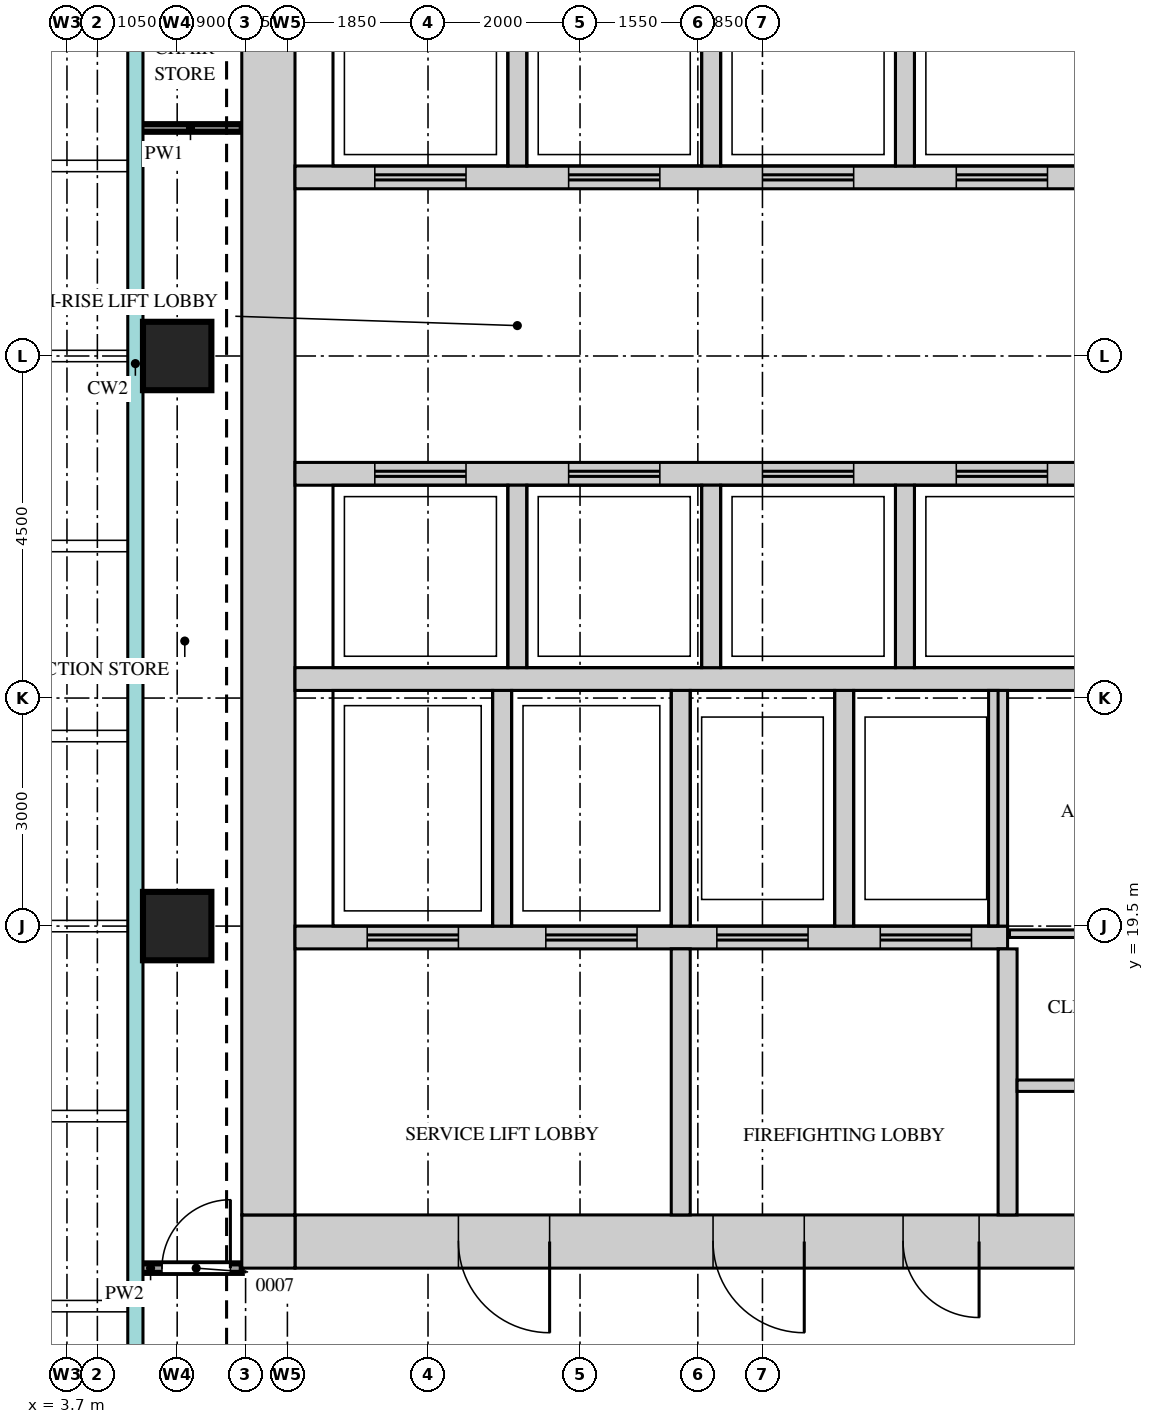
"""IFC4 building model, lengths in metres.
Left out: names, types, materials, properties, quantities, classifications, styles, units other than length and angle.
Written with IfcOpenShell. Run it as: python <this file> out.ifc"""

import sys

from ifc_helpers import new_model, si_unit, direction, frame, frame_2d, origin, origin_2d, place, context, subcontext, project, spatial, rectangle, extrude, source, transform, mapped, element, fill, save


model = new_model("IFC4")
c1 = context("Model", 3, precision=1e-05, world=origin(), true_north=direction((0.0, 1.0)))
c2 = subcontext(c1, "Body", "Model", "MODEL_VIEW")
j1 = project(units=[si_unit("LENGTHUNIT", "METRE"), si_unit("PLANEANGLEUNIT", "RADIAN")], contexts=[c1])
p1 = place(None, origin())
s1 = spatial("IfcSite", under=j1, at=p1, CompositionType="ELEMENT")
p2 = place(p1, origin())
s2 = spatial("IfcBuilding", under=s1, at=p2, CompositionType="ELEMENT")
p3 = place(p2, frame((0.0, 0.0, 258.2)))
s3 = spatial("IfcBuildingStorey", under=s2, at=p3, CompositionType="ELEMENT", Elevation=258.2)
m1 = source(origin(), c2, "Body", "SweptSolid", [
    extrude(rectangle(XDim=13.6, YDim=0.7, at=frame_2d((6.8, 0.0))), origin(), (0.0, 0.0, 1.0), 3.75),
])
p4 = place(p3, frame((6.7, 15.35, 0.0), z_axis=(0.0, 0.0, 1.0), x_axis=(1.0, 0.0, 0.0)))
e1 = element("IfcWall", 1, at=p4, inside=s3, PredefinedType="SHEAR", context=c2, shape_type="MappedRepresentation", body=[
    mapped(m1, transform((0.0, 0.0, 0.0))),
])
m2 = source(origin(), c2, "Body", "SweptSolid", [
    extrude(rectangle(XDim=1.2, YDim=2.1, at=frame_2d((0.6, 1.05))), frame((0.0, 0.36, 0.0), z_axis=(0.0, -1.0, 0.0), x_axis=(1.0, 0.0, 0.0)), (0.0, 0.0, 1.0), 0.72),
])
p5 = place(p4, frame((5.5, 0.0, 0.0)))
e2 = element("IfcOpeningElement", 2, at=p5, cuts=e1, PredefinedType="OPENING", context=c2, shape_type="MappedRepresentation", body=[
    mapped(m2, transform((0.0, 0.0, 0.0))),
])
p6 = place(p4, frame((2.15, 0.0, 0.0)))
e3 = element("IfcOpeningElement", 3, at=p6, cuts=e1, PredefinedType="OPENING", context=c2, shape_type="MappedRepresentation", body=[
    mapped(m2, transform((0.0, 0.0, 0.0))),
])
m3 = source(origin(), c2, "Body", "SweptSolid", [
    extrude(rectangle(XDim=1.0, YDim=2.1, at=frame_2d((0.5, 1.05))), frame((0.0, 0.36, 0.0), z_axis=(0.0, -1.0, 0.0), x_axis=(1.0, 0.0, 0.0)), (0.0, 0.0, 1.0), 0.72),
])
p7 = place(p4, frame((8.0, 0.0, 0.0)))
e4 = element("IfcOpeningElement", 4, at=p7, cuts=e1, PredefinedType="OPENING", context=c2, shape_type="MappedRepresentation", body=[
    mapped(m3, transform((0.0, 0.0, 0.0))),
])
m4 = source(origin(), c2, "Body", "SweptSolid", [
    extrude(rectangle(XDim=0.7, YDim=0.7, at=frame_2d((0.35, 0.0))), origin(), (0.0, 0.0, 1.0), 3.75),
])
p8 = place(p3, frame((6.0, 15.35, 0.0), z_axis=(0.0, 0.0, 1.0), x_axis=(1.0, 0.0, 0.0)))
e5 = element("IfcWall", 5, at=p8, inside=s3, PredefinedType="SHEAR", context=c2, shape_type="MappedRepresentation", body=[
    mapped(m4, transform((0.0, 0.0, 0.0))),
])
m5 = source(origin(), c2, "Body", "SweptSolid", [
    extrude(rectangle(XDim=22.6, YDim=0.7, at=frame_2d((11.3, 0.0))), origin(), (0.0, 0.0, 1.0), 3.75),
])
p9 = place(p3, frame((6.35, 15.7, 0.0), z_axis=(0.0, 0.0, 1.0), x_axis=(0.0, 1.0, 0.0)))
e6 = element("IfcWall", 6, at=p9, inside=s3, PredefinedType="SHEAR", context=c2, shape_type="MappedRepresentation", body=[
    mapped(m5, transform((0.0, 0.0, 0.0))),
])
m6 = source(origin(), c2, "Body", "SweptSolid", [
    extrude(rectangle(XDim=13.6, YDim=0.3, at=frame_2d((6.8, 0.0))), origin(), (0.0, 0.0, 1.0), 3.75),
])
p10 = place(p3, frame((6.7, 22.75, 0.0), z_axis=(0.0, 0.0, 1.0), x_axis=(1.0, 0.0, 0.0)))
e7 = element("IfcWall", 7, at=p10, inside=s3, PredefinedType="STANDARD", context=c2, shape_type="MappedRepresentation", body=[
    mapped(m6, transform((0.0, 0.0, 0.0))),
])
m7 = source(origin(), c2, "Body", "SweptSolid", [
    extrude(rectangle(XDim=9.375, YDim=0.3, at=frame_2d((4.688, 0.0))), origin(), (0.0, 0.0, 1.0), 3.75),
])
p11 = place(p3, frame((6.7, 19.35, 0.0), z_axis=(0.0, 0.0, 1.0), x_axis=(1.0, 0.0, 0.0)))
e8 = element("IfcWall", 8, at=p11, inside=s3, PredefinedType="STANDARD", context=c2, shape_type="MappedRepresentation", body=[
    mapped(m7, transform((0.0, 0.0, 0.0))),
])
m8 = source(origin(), c2, "Body", "SweptSolid", [
    extrude(rectangle(XDim=1.2, YDim=2.1, at=frame_2d((0.6, 1.05))), frame((0.0, 0.16, 0.0), z_axis=(0.0, -1.0, 0.0), x_axis=(1.0, 0.0, 0.0)), (0.0, 0.0, 1.0), 0.32),
])
p12 = place(p11, frame((0.95, 0.0, 0.0)))
e9 = element("IfcOpeningElement", 9, at=p12, cuts=e8, PredefinedType="OPENING", context=c2, shape_type="MappedRepresentation", body=[
    mapped(m8, transform((0.0, 0.0, 0.0))),
])
p13 = place(p11, frame((3.3, 0.0, 0.0)))
e10 = element("IfcOpeningElement", 10, at=p13, cuts=e8, PredefinedType="OPENING", context=c2, shape_type="MappedRepresentation", body=[
    mapped(m8, transform((0.0, 0.0, 0.0))),
])
p14 = place(p11, frame((5.55, 0.0, 0.0)))
e11 = element("IfcOpeningElement", 11, at=p14, cuts=e8, PredefinedType="OPENING", context=c2, shape_type="MappedRepresentation", body=[
    mapped(m8, transform((0.0, 0.0, 0.0))),
])
p15 = place(p11, frame((7.7, 0.0, 0.0)))
e12 = element("IfcOpeningElement", 12, at=p15, cuts=e8, PredefinedType="OPENING", context=c2, shape_type="MappedRepresentation", body=[
    mapped(m8, transform((0.0, 0.0, 0.0))),
])
p16 = place(p3, frame((6.7, 29.35, 0.0), z_axis=(0.0, 0.0, 1.0), x_axis=(1.0, 0.0, 0.0)))
e13 = element("IfcWall", 13, at=p16, inside=s3, PredefinedType="STANDARD", context=c2, shape_type="MappedRepresentation", body=[
    mapped(m6, transform((0.0, 0.0, 0.0))),
])
p17 = place(p16, frame((1.05, 0.0, 0.0)))
e14 = element("IfcOpeningElement", 14, at=p17, cuts=e13, PredefinedType="OPENING", context=c2, shape_type="MappedRepresentation", body=[
    mapped(m8, transform((0.0, 0.0, 0.0))),
])
p18 = place(p16, frame((3.6, 0.0, 0.0)))
e15 = element("IfcOpeningElement", 15, at=p18, cuts=e13, PredefinedType="OPENING", context=c2, shape_type="MappedRepresentation", body=[
    mapped(m8, transform((0.0, 0.0, 0.0))),
])
p19 = place(p16, frame((6.15, 0.0, 0.0)))
e16 = element("IfcOpeningElement", 16, at=p19, cuts=e13, PredefinedType="OPENING", context=c2, shape_type="MappedRepresentation", body=[
    mapped(m8, transform((0.0, 0.0, 0.0))),
])
p20 = place(p16, frame((8.7, 0.0, 0.0)))
e17 = element("IfcOpeningElement", 17, at=p20, cuts=e13, PredefinedType="OPENING", context=c2, shape_type="MappedRepresentation", body=[
    mapped(m8, transform((0.0, 0.0, 0.0))),
])
p21 = place(p16, frame((11.25, 0.0, 0.0)))
e18 = element("IfcOpeningElement", 18, at=p21, cuts=e13, PredefinedType="OPENING", context=c2, shape_type="MappedRepresentation", body=[
    mapped(m8, transform((0.0, 0.0, 0.0))),
])
p22 = place(p3, frame((6.7, 25.45, 0.0), z_axis=(0.0, 0.0, 1.0), x_axis=(1.0, 0.0, 0.0)))
e19 = element("IfcWall", 19, at=p22, inside=s3, PredefinedType="STANDARD", context=c2, shape_type="MappedRepresentation", body=[
    mapped(m6, transform((0.0, 0.0, 0.0))),
])
p23 = place(p22, frame((1.05, 0.0, 0.0)))
e20 = element("IfcOpeningElement", 20, at=p23, cuts=e19, PredefinedType="OPENING", context=c2, shape_type="MappedRepresentation", body=[
    mapped(m8, transform((0.0, 0.0, 0.0))),
])
p24 = place(p22, frame((3.6, 0.0, 0.0)))
e21 = element("IfcOpeningElement", 21, at=p24, cuts=e19, PredefinedType="OPENING", context=c2, shape_type="MappedRepresentation", body=[
    mapped(m8, transform((0.0, 0.0, 0.0))),
])
p25 = place(p22, frame((6.15, 0.0, 0.0)))
e22 = element("IfcOpeningElement", 22, at=p25, cuts=e19, PredefinedType="OPENING", context=c2, shape_type="MappedRepresentation", body=[
    mapped(m8, transform((0.0, 0.0, 0.0))),
])
p26 = place(p22, frame((8.7, 0.0, 0.0)))
e23 = element("IfcOpeningElement", 23, at=p26, cuts=e19, PredefinedType="OPENING", context=c2, shape_type="MappedRepresentation", body=[
    mapped(m8, transform((0.0, 0.0, 0.0))),
])
p27 = place(p22, frame((11.25, 0.0, 0.0)))
e24 = element("IfcOpeningElement", 24, at=p27, cuts=e19, PredefinedType="OPENING", context=c2, shape_type="MappedRepresentation", body=[
    mapped(m8, transform((0.0, 0.0, 0.0))),
])
m9 = source(origin(), c2, "Body", "SweptSolid", [
    extrude(rectangle(XDim=3.1, YDim=0.25, at=frame_2d((1.55, 0.0))), origin(), (0.0, 0.0, 1.0), 3.75),
])
for number, where, z_axis, x_axis in (
    (25, (9.425, 19.5, 0.0), (0.0, 0.0, 1.0), (0.0, 1.0, 0.0)),
    (26, (11.775, 19.5, 0.0), (0.0, 0.0, 1.0), (0.0, 1.0, 0.0)),
    (27, (13.925, 19.5, 0.0), (0.0, 0.0, 1.0), (0.0, 1.0, 0.0)),
    (28, (15.95, 19.5, 0.0), (0.0, 0.0, 1.0), (0.0, 1.0, 0.0)),
):
    element("IfcWall", number, at=place(p3, frame(where, z_axis=z_axis, x_axis=x_axis)), inside=s3, PredefinedType="STANDARD", context=c2, shape_type="MappedRepresentation", body=[
        mapped(m9, transform((0.0, 0.0, 0.0))),
    ])
m10 = source(origin(), c2, "Body", "SweptSolid", [
    extrude(rectangle(XDim=2.4, YDim=0.25, at=frame_2d((1.2, 0.0))), origin(), (0.0, 0.0, 1.0), 3.75),
])
for number, where, z_axis, x_axis in (
    (29, (9.625, 29.5, 0.0), (0.0, 0.0, 1.0), (0.0, 1.0, 0.0)),
    (30, (12.175, 29.5, 0.0), (0.0, 0.0, 1.0), (0.0, 1.0, 0.0)),
    (31, (14.725, 29.5, 0.0), (0.0, 0.0, 1.0), (0.0, 1.0, 0.0)),
):
    element("IfcWall", number, at=place(p3, frame(where, z_axis=z_axis, x_axis=x_axis)), inside=s3, PredefinedType="STANDARD", context=c2, shape_type="MappedRepresentation", body=[
        mapped(m10, transform((0.0, 0.0, 0.0))),
    ])
m11 = source(origin(), c2, "Body", "SweptSolid", [
    extrude(rectangle(XDim=2.4, YDim=0.25, at=frame_2d((1.2, 0.0))), origin(), (0.0, 0.0, 1.0), 3.75),
])
for number, where, z_axis, x_axis in (
    (32, (9.625, 22.9, 0.0), (0.0, 0.0, 1.0), (0.0, 1.0, 0.0)),
    (33, (12.175, 22.9, 0.0), (0.0, 0.0, 1.0), (0.0, 1.0, 0.0)),
    (34, (14.725, 22.9, 0.0), (0.0, 0.0, 1.0), (0.0, 1.0, 0.0)),
):
    element("IfcWall", number, at=place(p3, frame(where, z_axis=z_axis, x_axis=x_axis)), inside=s3, PredefinedType="STANDARD", context=c2, shape_type="MappedRepresentation", body=[
        mapped(m11, transform((0.0, 0.0, 0.0))),
    ])
m12 = source(origin(), c2, "Body", "SweptSolid", [
    extrude(rectangle(XDim=3.5, YDim=0.25, at=frame_2d((1.75, 0.0))), origin(), (0.0, 0.0, 1.0), 3.75),
])
for number, where, z_axis, x_axis in (
    (35, (16.075, 15.7, 0.0), (0.0, 0.0, 1.0), (0.0, 1.0, 0.0)),
    (36, (11.775, 15.7, 0.0), (0.0, 0.0, 1.0), (0.0, 1.0, 0.0)),
):
    element("IfcWall", number, at=place(p3, frame(where, z_axis=z_axis, x_axis=x_axis)), inside=s3, PredefinedType="STANDARD", context=c2, shape_type="MappedRepresentation", body=[
        mapped(m12, transform((0.0, 0.0, 0.0))),
    ])
m13 = source(origin(), c2, "Body", "SweptSolid", [
    extrude(rectangle(XDim=0.9, YDim=0.9, at=origin_2d()), origin(), (0.0, 0.0, 1.0), 3.75),
])
for number, where, z_axis, x_axis in (
    (37, (5.15, 19.5, 0.0), (0.0, 0.0, 1.0), (1.0, 0.0, 0.0)),
    (38, (5.15, 27.0, 0.0), (0.0, 0.0, 1.0), (1.0, 0.0, 0.0)),
):
    element("IfcColumn", number, at=place(p3, frame(where, z_axis=z_axis, x_axis=x_axis)), inside=s3, PredefinedType="COLUMN", context=c2, shape_type="MappedRepresentation", body=[
        mapped(m13, transform((0.0, 0.0, 0.0))),
    ])
m14 = source(origin(), c2, "Body", "SweptSolid", [
    extrude(rectangle(XDim=1.35, YDim=0.125, at=frame_2d((0.675, 0.0))), origin(), (0.0, 0.0, 1.0), 3.8),
])
p28 = place(p3, frame((4.65, 15.0, 0.0), z_axis=(0.0, 0.0, 1.0), x_axis=(1.0, 0.0, 0.0)))
e39 = element("IfcWall", 39, at=p28, inside=s3, PredefinedType="PARTITIONING", context=c2, shape_type="MappedRepresentation", body=[
    mapped(m14, transform((0.0, 0.0, 0.0))),
])
m15 = source(origin(), c2, "Body", "SweptSolid", [
    extrude(rectangle(XDim=0.9, YDim=2.1, at=frame_2d((0.45, 1.05))), frame((0.0, 0.073, 0.0), z_axis=(0.0, -1.0, 0.0), x_axis=(1.0, 0.0, 0.0)), (0.0, 0.0, 1.0), 0.145),
])
p29 = place(p28, frame((0.3, 0.0, 0.0)))
e40 = element("IfcOpeningElement", 40, at=p29, cuts=e39, PredefinedType="OPENING", context=c2, shape_type="MappedRepresentation", body=[
    mapped(m15, transform((0.0, 0.0, 0.0))),
])
m16 = source(origin(), c2, "Body", "SweptSolid", [
    extrude(rectangle(XDim=4.0, YDim=0.15, at=frame_2d((2.0, 0.0))), origin(), (0.0, 0.0, 1.0), 3.8),
])
p30 = place(p3, frame((16.2, 17.4, 0.0), z_axis=(0.0, 0.0, 1.0), x_axis=(1.0, 0.0, 0.0)))
e41 = element("IfcWall", 41, at=p30, inside=s3, PredefinedType="PARTITIONING", context=c2, shape_type="MappedRepresentation", body=[
    mapped(m16, transform((0.0, 0.0, 0.0))),
])
m17 = source(origin(), c2, "Body", "SweptSolid", [
    extrude(rectangle(XDim=4.1, YDim=0.1, at=frame_2d((2.05, 0.0))), origin(), (0.0, 0.0, 1.0), 3.8),
])
p31 = place(p3, frame((16.1, 19.4, 0.0), z_axis=(0.0, 0.0, 1.0), x_axis=(1.0, 0.0, 0.0)))
e42 = element("IfcWall", 42, at=p31, inside=s3, PredefinedType="PARTITIONING", context=c2, shape_type="MappedRepresentation", body=[
    mapped(m17, transform((0.0, 0.0, 0.0))),
])
m18 = source(origin(), c2, "Body", "SweptSolid", [
    extrude(rectangle(XDim=1.35, YDim=0.1, at=frame_2d((0.675, 0.0))), origin(), (0.0, 0.0, 1.0), 3.8),
])
p32 = place(p3, frame((4.65, 30.0, 0.0), z_axis=(0.0, 0.0, 1.0), x_axis=(1.0, 0.0, 0.0)))
e43 = element("IfcWall", 43, at=p32, inside=s3, PredefinedType="PARTITIONING", context=c2, shape_type="MappedRepresentation", body=[
    mapped(m18, transform((0.0, 0.0, 0.0))),
])
m19 = source(origin(), c2, "Body", "SweptSolid", [
    extrude(rectangle(XDim=1.2, YDim=2.1, at=frame_2d((0.6, 1.05))), frame((0.0, 0.3, 0.0), z_axis=(0.0, -1.0, 0.0), x_axis=(1.0, 0.0, 0.0)), (0.0, 0.0, 1.0), 0.6),
])
p33 = place(p5, origin())
e44 = element("IfcDoor", 44, at=p33, inside=s3, OperationType="SINGLE_SWING_RIGHT", PredefinedType="DOOR", context=c2, shape_type="MappedRepresentation", body=[
    mapped(m19, transform((0.0, 0.0, 0.0))),
])
fill(e2, e44)
p34 = place(p6, origin())
e45 = element("IfcDoor", 45, at=p34, inside=s3, OperationType="SINGLE_SWING_RIGHT", PredefinedType="DOOR", context=c2, shape_type="MappedRepresentation", body=[
    mapped(m19, transform((0.0, 0.0, 0.0))),
])
fill(e3, e45)
m20 = source(origin(), c2, "Body", "SweptSolid", [
    extrude(rectangle(XDim=1.0, YDim=2.1, at=frame_2d((0.5, 1.05))), frame((0.0, 0.3, 0.0), z_axis=(0.0, -1.0, 0.0), x_axis=(1.0, 0.0, 0.0)), (0.0, 0.0, 1.0), 0.6),
])
p35 = place(p7, origin())
e46 = element("IfcDoor", 46, at=p35, inside=s3, OperationType="SINGLE_SWING_RIGHT", PredefinedType="DOOR", context=c2, shape_type="MappedRepresentation", body=[
    mapped(m20, transform((0.0, 0.0, 0.0))),
])
fill(e4, e46)
m21 = source(origin(), c2, "Body", "SweptSolid", [
    extrude(rectangle(XDim=0.9, YDim=2.1, at=frame_2d((0.45, 1.05))), frame((0.0, 0.025, 0.0), z_axis=(0.0, -1.0, 0.0), x_axis=(1.0, 0.0, 0.0)), (0.0, 0.0, 1.0), 0.05),
])
p36 = place(p29, origin())
e47 = element("IfcDoor", 47, at=p36, inside=s3, OperationType="SINGLE_SWING_LEFT", PredefinedType="DOOR", context=c2, shape_type="MappedRepresentation", body=[
    mapped(m21, transform((0.0, 0.0, 0.0))),
])
fill(e40, e47)
m22 = source(origin(), c2, "Body", "SweptSolid", [
    extrude(rectangle(XDim=1.2, YDim=2.1, at=frame_2d((0.6, 1.05))), frame((0.0, 0.025, 0.0), z_axis=(0.0, -1.0, 0.0), x_axis=(1.0, 0.0, 0.0)), (0.0, 0.0, 1.0), 0.05),
])
p37 = place(p23, origin())
e48 = element("IfcDoor", 48, at=p37, inside=s3, OperationType="DOUBLE_DOOR_SLIDING", PredefinedType="DOOR", context=c2, shape_type="MappedRepresentation", body=[
    mapped(m22, transform((0.0, 0.0, 0.0))),
])
fill(e20, e48)
p38 = place(p24, origin())
e49 = element("IfcDoor", 49, at=p38, inside=s3, OperationType="DOUBLE_DOOR_SLIDING", PredefinedType="DOOR", context=c2, shape_type="MappedRepresentation", body=[
    mapped(m22, transform((0.0, 0.0, 0.0))),
])
fill(e21, e49)
p39 = place(p25, origin())
e50 = element("IfcDoor", 50, at=p39, inside=s3, OperationType="DOUBLE_DOOR_SLIDING", PredefinedType="DOOR", context=c2, shape_type="MappedRepresentation", body=[
    mapped(m22, transform((0.0, 0.0, 0.0))),
])
fill(e22, e50)
p40 = place(p26, origin())
e51 = element("IfcDoor", 51, at=p40, inside=s3, OperationType="DOUBLE_DOOR_SLIDING", PredefinedType="DOOR", context=c2, shape_type="MappedRepresentation", body=[
    mapped(m22, transform((0.0, 0.0, 0.0))),
])
fill(e23, e51)
p41 = place(p17, origin())
e52 = element("IfcDoor", 52, at=p41, inside=s3, OperationType="DOUBLE_DOOR_SLIDING", PredefinedType="DOOR", context=c2, shape_type="MappedRepresentation", body=[
    mapped(m22, transform((0.0, 0.0, 0.0))),
])
fill(e14, e52)
p42 = place(p18, origin())
e53 = element("IfcDoor", 53, at=p42, inside=s3, OperationType="DOUBLE_DOOR_SLIDING", PredefinedType="DOOR", context=c2, shape_type="MappedRepresentation", body=[
    mapped(m22, transform((0.0, 0.0, 0.0))),
])
fill(e15, e53)
p43 = place(p19, origin())
e54 = element("IfcDoor", 54, at=p43, inside=s3, OperationType="DOUBLE_DOOR_SLIDING", PredefinedType="DOOR", context=c2, shape_type="MappedRepresentation", body=[
    mapped(m22, transform((0.0, 0.0, 0.0))),
])
fill(e16, e54)
p44 = place(p20, origin())
e55 = element("IfcDoor", 55, at=p44, inside=s3, OperationType="DOUBLE_DOOR_SLIDING", PredefinedType="DOOR", context=c2, shape_type="MappedRepresentation", body=[
    mapped(m22, transform((0.0, 0.0, 0.0))),
])
fill(e17, e55)
p45 = place(p12, origin())
e56 = element("IfcDoor", 56, at=p45, inside=s3, OperationType="DOUBLE_DOOR_SLIDING", PredefinedType="DOOR", context=c2, shape_type="MappedRepresentation", body=[
    mapped(m22, transform((0.0, 0.0, 0.0))),
])
fill(e9, e56)
p46 = place(p13, origin())
e57 = element("IfcDoor", 57, at=p46, inside=s3, OperationType="DOUBLE_DOOR_SLIDING", PredefinedType="DOOR", context=c2, shape_type="MappedRepresentation", body=[
    mapped(m22, transform((0.0, 0.0, 0.0))),
])
fill(e10, e57)
p47 = place(p14, origin())
e58 = element("IfcDoor", 58, at=p47, inside=s3, OperationType="DOUBLE_DOOR_SLIDING", PredefinedType="DOOR", context=c2, shape_type="MappedRepresentation", body=[
    mapped(m22, transform((0.0, 0.0, 0.0))),
])
fill(e11, e58)
p48 = place(p15, origin())
e59 = element("IfcDoor", 59, at=p48, inside=s3, OperationType="DOUBLE_DOOR_SLIDING", PredefinedType="DOOR", context=c2, shape_type="MappedRepresentation", body=[
    mapped(m22, transform((0.0, 0.0, 0.0))),
])
fill(e12, e59)
save(model, sys.argv[1])
